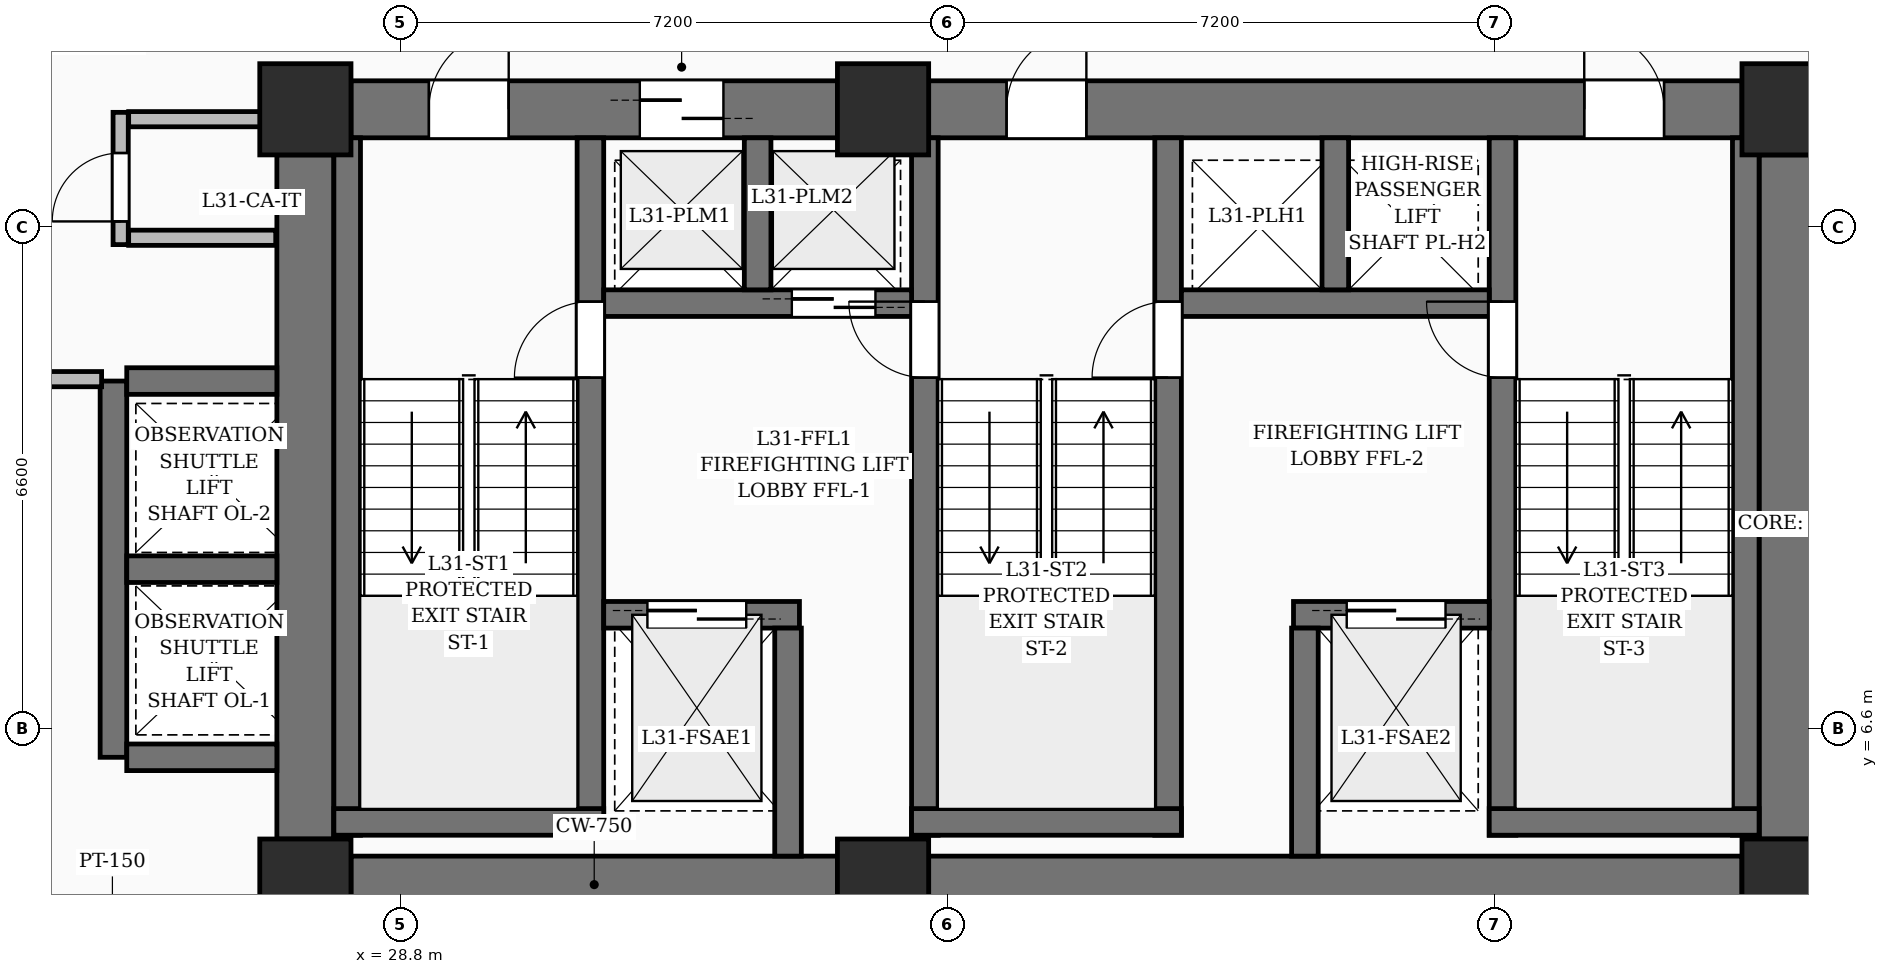
"""IFC4 building model, lengths in metres.
Left out: names, types, materials, properties, quantities, classifications, styles, units other than length and angle.
Written with IfcOpenShell. Run it as: python <this file> out.ifc"""

import sys

from ifc_helpers import new_model, si_unit, direction, frame, frame_2d, origin, origin_2d, place, context, subcontext, project, spatial, rectangle, extrude, element, fill, save


model = new_model("IFC4")
c1 = context("Model", 3, precision=1e-05, world=origin(), true_north=direction((0.0, 1.0)))
c2 = subcontext(c1, "Body", "Model", "MODEL_VIEW")
j1 = project(units=[si_unit("LENGTHUNIT", "METRE"), si_unit("PLANEANGLEUNIT", "RADIAN")], contexts=[c1])
p1 = place(None, origin())
s1 = spatial("IfcSite", under=j1, at=p1, CompositionType="ELEMENT")
p2 = place(p1, origin())
s2 = spatial("IfcBuilding", under=s1, at=p2, CompositionType="ELEMENT")
p3 = place(p2, frame((0.0, 0.0, 124.8)))
s3 = spatial("IfcBuildingStorey", under=s2, at=p3, CompositionType="ELEMENT", Elevation=124.8)
for number, where, z_axis, x_axis in (
    (1, (27.55, 4.55, 0.0), (0.0, 0.0, 1.0), (1.0, 0.0, 0.0)),
    (2, (35.15, 4.55, 0.0), (0.0, 0.0, 1.0), (1.0, 0.0, 0.0)),
    (3, (47.05, 4.55, 0.0), (0.0, 0.0, 1.0), (1.0, 0.0, 0.0)),
    (4, (27.55, 14.75, 0.0), (0.0, 0.0, 1.0), (1.0, 0.0, 0.0)),
    (5, (35.15, 14.75, 0.0), (0.0, 0.0, 1.0), (1.0, 0.0, 0.0)),
    (6, (47.05, 14.75, 0.0), (0.0, 0.0, 1.0), (1.0, 0.0, 0.0)),
):
    element("IfcColumn", number, at=place(p3, frame(where, z_axis=z_axis, x_axis=x_axis)), inside=s3, PredefinedType="COLUMN", context=c2, shape_type="SweptSolid", body=[
        extrude(rectangle(XDim=1.2, YDim=1.2, at=origin_2d()), origin(), (0.0, 0.0, 1.0), 3.6),
    ])
p4 = place(p3, frame((28.15, 4.55, 0.0), z_axis=(0.0, 0.0, 1.0), x_axis=(1.0, 0.0, 0.0)))
e7 = element("IfcWall", 7, at=p4, inside=s3, PredefinedType="SHEAR", context=c2, shape_type="SweptSolid", body=[
    extrude(rectangle(XDim=6.4, YDim=0.75, at=frame_2d((3.2, 0.0))), origin(), (0.0, 0.0, 1.0), 3.6),
])
p5 = place(p3, frame((35.75, 4.55, 0.0), z_axis=(0.0, 0.0, 1.0), x_axis=(1.0, 0.0, 0.0)))
e8 = element("IfcWall", 8, at=p5, inside=s3, PredefinedType="SHEAR", context=c2, shape_type="SweptSolid", body=[
    extrude(rectangle(XDim=10.7, YDim=0.75, at=frame_2d((5.35, 0.0))), origin(), (0.0, 0.0, 1.0), 3.6),
])
p6 = place(p3, frame((28.15, 14.75, 0.0), z_axis=(0.0, 0.0, 1.0), x_axis=(1.0, 0.0, 0.0)))
e9 = element("IfcWall", 9, at=p6, inside=s3, PredefinedType="SHEAR", context=c2, shape_type="SweptSolid", body=[
    extrude(rectangle(XDim=6.4, YDim=0.75, at=frame_2d((3.2, 0.0))), origin(), (0.0, 0.0, 1.0), 3.6),
])
p7 = place(p6, frame((1.025, 0.0, 0.0)))
e10 = element("IfcOpeningElement", 10, at=p7, cuts=e9, PredefinedType="OPENING", context=c2, shape_type="SweptSolid", body=[
    extrude(rectangle(XDim=1.05, YDim=2.15, at=frame_2d((0.525, 1.075))), frame((0.0, 0.385, 0.0), z_axis=(0.0, -1.0, 0.0), x_axis=(1.0, 0.0, 0.0)), (0.0, 0.0, 1.0), 0.77),
])
p8 = place(p6, frame((3.8, 0.0, 0.0)))
e11 = element("IfcOpeningElement", 11, at=p8, cuts=e9, PredefinedType="OPENING", context=c2, shape_type="SweptSolid", body=[
    extrude(rectangle(XDim=1.1, YDim=2.2, at=frame_2d((0.55, 1.1))), frame((0.0, 0.385, 0.0), z_axis=(0.0, -1.0, 0.0), x_axis=(1.0, 0.0, 0.0)), (0.0, 0.0, 1.0), 0.77),
])
p9 = place(p3, frame((35.75, 14.75, 0.0), z_axis=(0.0, 0.0, 1.0), x_axis=(1.0, 0.0, 0.0)))
e12 = element("IfcWall", 12, at=p9, inside=s3, PredefinedType="SHEAR", context=c2, shape_type="SweptSolid", body=[
    extrude(rectangle(XDim=10.7, YDim=0.75, at=frame_2d((5.35, 0.0))), origin(), (0.0, 0.0, 1.0), 3.6),
])
p10 = place(p9, frame((1.025, 0.0, 0.0)))
e13 = element("IfcOpeningElement", 13, at=p10, cuts=e12, PredefinedType="OPENING", context=c2, shape_type="SweptSolid", body=[
    extrude(rectangle(XDim=1.05, YDim=2.15, at=frame_2d((0.525, 1.075))), frame((0.0, 0.385, 0.0), z_axis=(0.0, -1.0, 0.0), x_axis=(1.0, 0.0, 0.0)), (0.0, 0.0, 1.0), 0.77),
])
p11 = place(p9, frame((8.625, 0.0, 0.0)))
e14 = element("IfcOpeningElement", 14, at=p11, cuts=e12, PredefinedType="OPENING", context=c2, shape_type="SweptSolid", body=[
    extrude(rectangle(XDim=1.05, YDim=2.15, at=frame_2d((0.525, 1.075))), frame((0.0, 0.385, 0.0), z_axis=(0.0, -1.0, 0.0), x_axis=(1.0, 0.0, 0.0)), (0.0, 0.0, 1.0), 0.77),
])
for number, where, z_axis, x_axis in (
    (15, (27.55, 5.15, 0.0), (0.0, 0.0, 1.0), (0.0, 1.0, 0.0)),
    (16, (47.05, 5.15, 0.0), (0.0, 0.0, 1.0), (0.0, 1.0, 0.0)),
):
    element("IfcWall", number, at=place(p3, frame(where, z_axis=z_axis, x_axis=x_axis)), inside=s3, PredefinedType="SHEAR", context=c2, shape_type="SweptSolid", body=[
        extrude(rectangle(XDim=9.0, YDim=0.75, at=frame_2d((4.5, 0.0))), origin(), (0.0, 0.0, 1.0), 3.6),
    ])
p12 = place(p3, frame((28.1, 5.2, 0.0), z_axis=(0.0, 0.0, 1.0), x_axis=(0.0, 1.0, 0.0)))
e17 = element("IfcWall", 17, at=p12, inside=s3, PredefinedType="SOLIDWALL", context=c2, shape_type="SweptSolid", body=[
    extrude(rectangle(XDim=9.175, YDim=0.35, at=frame_2d((4.587, 0.0))), origin(), (0.0, 0.0, 1.0), 3.6),
])
p13 = place(p3, frame((31.3, 5.2, 0.0), z_axis=(0.0, 0.0, 1.0), x_axis=(0.0, 1.0, 0.0)))
e18 = element("IfcWall", 18, at=p13, inside=s3, PredefinedType="SOLIDWALL", context=c2, shape_type="SweptSolid", body=[
    extrude(rectangle(XDim=9.175, YDim=0.35, at=frame_2d((4.587, 0.0))), origin(), (0.0, 0.0, 1.0), 3.6),
])
p14 = place(p13, frame((6.02, 0.0, 0.0)))
e19 = element("IfcOpeningElement", 19, at=p14, cuts=e18, PredefinedType="OPENING", context=c2, shape_type="SweptSolid", body=[
    extrude(rectangle(XDim=1.0, YDim=2.15, at=frame_2d((0.5, 1.075))), frame((0.0, 0.185, 0.0), z_axis=(0.0, -1.0, 0.0), x_axis=(1.0, 0.0, 0.0)), (0.0, 0.0, 1.0), 0.37),
])
p15 = place(p3, frame((27.925, 5.375, 0.0), z_axis=(0.0, 0.0, 1.0), x_axis=(1.0, 0.0, 0.0)))
e20 = element("IfcWall", 20, at=p15, inside=s3, PredefinedType="SOLIDWALL", context=c2, shape_type="SweptSolid", body=[
    extrude(rectangle(XDim=3.55, YDim=0.35, at=frame_2d((1.775, 0.0))), origin(), (0.0, 0.0, 1.0), 3.6),
])
p16 = place(p3, frame((35.7, 5.2, 0.0), z_axis=(0.0, 0.0, 1.0), x_axis=(0.0, 1.0, 0.0)))
e21 = element("IfcWall", 21, at=p16, inside=s3, PredefinedType="SOLIDWALL", context=c2, shape_type="SweptSolid", body=[
    extrude(rectangle(XDim=9.175, YDim=0.35, at=frame_2d((4.587, 0.0))), origin(), (0.0, 0.0, 1.0), 3.6),
])
p17 = place(p16, frame((6.02, 0.0, 0.0)))
e22 = element("IfcOpeningElement", 22, at=p17, cuts=e21, PredefinedType="OPENING", context=c2, shape_type="SweptSolid", body=[
    extrude(rectangle(XDim=1.0, YDim=2.15, at=frame_2d((0.5, 1.075))), frame((0.0, 0.185, 0.0), z_axis=(0.0, -1.0, 0.0), x_axis=(1.0, 0.0, 0.0)), (0.0, 0.0, 1.0), 0.37),
])
p18 = place(p3, frame((38.9, 5.2, 0.0), z_axis=(0.0, 0.0, 1.0), x_axis=(0.0, 1.0, 0.0)))
e23 = element("IfcWall", 23, at=p18, inside=s3, PredefinedType="SOLIDWALL", context=c2, shape_type="SweptSolid", body=[
    extrude(rectangle(XDim=9.175, YDim=0.35, at=frame_2d((4.587, 0.0))), origin(), (0.0, 0.0, 1.0), 3.6),
])
p19 = place(p18, frame((6.02, 0.0, 0.0)))
e24 = element("IfcOpeningElement", 24, at=p19, cuts=e23, PredefinedType="OPENING", context=c2, shape_type="SweptSolid", body=[
    extrude(rectangle(XDim=1.0, YDim=2.15, at=frame_2d((0.5, 1.075))), frame((0.0, 0.185, 0.0), z_axis=(0.0, -1.0, 0.0), x_axis=(1.0, 0.0, 0.0)), (0.0, 0.0, 1.0), 0.37),
])
p20 = place(p3, frame((35.525, 5.375, 0.0), z_axis=(0.0, 0.0, 1.0), x_axis=(1.0, 0.0, 0.0)))
e25 = element("IfcWall", 25, at=p20, inside=s3, PredefinedType="SOLIDWALL", context=c2, shape_type="SweptSolid", body=[
    extrude(rectangle(XDim=3.55, YDim=0.35, at=frame_2d((1.775, 0.0))), origin(), (0.0, 0.0, 1.0), 3.6),
])
p21 = place(p3, frame((43.3, 5.2, 0.0), z_axis=(0.0, 0.0, 1.0), x_axis=(0.0, 1.0, 0.0)))
e26 = element("IfcWall", 26, at=p21, inside=s3, PredefinedType="SOLIDWALL", context=c2, shape_type="SweptSolid", body=[
    extrude(rectangle(XDim=9.175, YDim=0.35, at=frame_2d((4.587, 0.0))), origin(), (0.0, 0.0, 1.0), 3.6),
])
p22 = place(p21, frame((6.02, 0.0, 0.0)))
e27 = element("IfcOpeningElement", 27, at=p22, cuts=e26, PredefinedType="OPENING", context=c2, shape_type="SweptSolid", body=[
    extrude(rectangle(XDim=1.0, YDim=2.15, at=frame_2d((0.5, 1.075))), frame((0.0, 0.185, 0.0), z_axis=(0.0, -1.0, 0.0), x_axis=(1.0, 0.0, 0.0)), (0.0, 0.0, 1.0), 0.37),
])
p23 = place(p3, frame((46.5, 5.2, 0.0), z_axis=(0.0, 0.0, 1.0), x_axis=(0.0, 1.0, 0.0)))
e28 = element("IfcWall", 28, at=p23, inside=s3, PredefinedType="SOLIDWALL", context=c2, shape_type="SweptSolid", body=[
    extrude(rectangle(XDim=9.175, YDim=0.35, at=frame_2d((4.587, 0.0))), origin(), (0.0, 0.0, 1.0), 3.6),
])
p24 = place(p3, frame((43.125, 5.375, 0.0), z_axis=(0.0, 0.0, 1.0), x_axis=(1.0, 0.0, 0.0)))
e29 = element("IfcWall", 29, at=p24, inside=s3, PredefinedType="SOLIDWALL", context=c2, shape_type="SweptSolid", body=[
    extrude(rectangle(XDim=3.55, YDim=0.35, at=frame_2d((1.775, 0.0))), origin(), (0.0, 0.0, 1.0), 3.6),
])
p25 = place(p3, frame((31.475, 8.1, 0.0), z_axis=(0.0, 0.0, 1.0), x_axis=(1.0, 0.0, 0.0)))
e30 = element("IfcWall", 30, at=p25, inside=s3, PredefinedType="SOLIDWALL", context=c2, shape_type="SweptSolid", body=[
    extrude(rectangle(XDim=2.575, YDim=0.35, at=frame_2d((1.288, 0.0))), origin(), (0.0, 0.0, 1.0), 3.6),
])
p26 = place(p25, frame((0.575, 0.0, 0.0)))
e31 = element("IfcOpeningElement", 31, at=p26, cuts=e30, PredefinedType="OPENING", context=c2, shape_type="SweptSolid", body=[
    extrude(rectangle(XDim=1.3, YDim=2.25, at=frame_2d((0.65, 1.125))), frame((0.0, 0.185, 0.0), z_axis=(0.0, -1.0, 0.0), x_axis=(1.0, 0.0, 0.0)), (0.0, 0.0, 1.0), 0.37),
])
p27 = place(p3, frame((40.55, 8.1, 0.0), z_axis=(0.0, 0.0, 1.0), x_axis=(1.0, 0.0, 0.0)))
e32 = element("IfcWall", 32, at=p27, inside=s3, PredefinedType="SOLIDWALL", context=c2, shape_type="SweptSolid", body=[
    extrude(rectangle(XDim=2.575, YDim=0.35, at=frame_2d((1.288, 0.0))), origin(), (0.0, 0.0, 1.0), 3.6),
])
p28 = place(p27, frame((0.7, 0.0, 0.0)))
e33 = element("IfcOpeningElement", 33, at=p28, cuts=e32, PredefinedType="OPENING", context=c2, shape_type="SweptSolid", body=[
    extrude(rectangle(XDim=1.3, YDim=2.25, at=frame_2d((0.65, 1.125))), frame((0.0, 0.185, 0.0), z_axis=(0.0, -1.0, 0.0), x_axis=(1.0, 0.0, 0.0)), (0.0, 0.0, 1.0), 0.37),
])
for number, where, z_axis, x_axis in (
    (34, (33.9, 4.925, 0.0), (0.0, 0.0, 1.0), (0.0, 1.0, 0.0)),
    (35, (40.7, 4.925, 0.0), (0.0, 0.0, 1.0), (0.0, 1.0, 0.0)),
):
    element("IfcWall", number, at=place(p3, frame(where, z_axis=z_axis, x_axis=x_axis)), inside=s3, PredefinedType="SOLIDWALL", context=c2, shape_type="SweptSolid", body=[
        extrude(rectangle(XDim=3.0, YDim=0.35, at=frame_2d((1.5, 0.0))), origin(), (0.0, 0.0, 1.0), 3.6),
    ])
p29 = place(p3, frame((31.475, 12.2, 0.0), z_axis=(0.0, 0.0, 1.0), x_axis=(1.0, 0.0, 0.0)))
e36 = element("IfcWall", 36, at=p29, inside=s3, PredefinedType="SOLIDWALL", context=c2, shape_type="SweptSolid", body=[
    extrude(rectangle(XDim=4.05, YDim=0.35, at=frame_2d((2.025, 0.0))), origin(), (0.0, 0.0, 1.0), 3.6),
])
p30 = place(p29, frame((2.475, 0.0, 0.0)))
e37 = element("IfcOpeningElement", 37, at=p30, cuts=e36, PredefinedType="OPENING", context=c2, shape_type="SweptSolid", body=[
    extrude(rectangle(XDim=1.1, YDim=2.2, at=frame_2d((0.55, 1.1))), frame((0.0, 0.185, 0.0), z_axis=(0.0, -1.0, 0.0), x_axis=(1.0, 0.0, 0.0)), (0.0, 0.0, 1.0), 0.37),
])
p31 = place(p3, frame((33.5, 12.375, 0.0), z_axis=(0.0, 0.0, 1.0), x_axis=(0.0, 1.0, 0.0)))
e38 = element("IfcWall", 38, at=p31, inside=s3, PredefinedType="SOLIDWALL", context=c2, shape_type="SweptSolid", body=[
    extrude(rectangle(XDim=2.0, YDim=0.35, at=frame_2d((1.0, 0.0))), origin(), (0.0, 0.0, 1.0), 3.6),
])
p32 = place(p3, frame((39.075, 12.2, 0.0), z_axis=(0.0, 0.0, 1.0), x_axis=(1.0, 0.0, 0.0)))
e39 = element("IfcWall", 39, at=p32, inside=s3, PredefinedType="SOLIDWALL", context=c2, shape_type="SweptSolid", body=[
    extrude(rectangle(XDim=4.05, YDim=0.35, at=frame_2d((2.025, 0.0))), origin(), (0.0, 0.0, 1.0), 3.6),
])
p33 = place(p3, frame((41.1, 12.375, 0.0), z_axis=(0.0, 0.0, 1.0), x_axis=(0.0, 1.0, 0.0)))
e40 = element("IfcWall", 40, at=p33, inside=s3, PredefinedType="SOLIDWALL", context=c2, shape_type="SweptSolid", body=[
    extrude(rectangle(XDim=2.0, YDim=0.35, at=frame_2d((1.0, 0.0))), origin(), (0.0, 0.0, 1.0), 3.6),
])
p34 = place(p3, frame((25.025, 6.225, 0.0), z_axis=(0.0, 0.0, 1.0), x_axis=(0.0, 1.0, 0.0)))
e41 = element("IfcWall", 41, at=p34, inside=s3, PredefinedType="SOLIDWALL", context=c2, shape_type="SweptSolid", body=[
    extrude(rectangle(XDim=4.95, YDim=0.35, at=frame_2d((2.475, 0.0))), origin(), (0.0, 0.0, 1.0), 3.6),
])
for number, where, z_axis, x_axis in (
    (42, (25.2, 6.225, 0.0), (0.0, 0.0, 1.0), (1.0, 0.0, 0.0)),
    (43, (25.2, 8.7, 0.0), (0.0, 0.0, 1.0), (1.0, 0.0, 0.0)),
    (44, (25.2, 11.175, 0.0), (0.0, 0.0, 1.0), (1.0, 0.0, 0.0)),
):
    element("IfcWall", number, at=place(p3, frame(where, z_axis=z_axis, x_axis=x_axis)), inside=s3, PredefinedType="SOLIDWALL", context=c2, shape_type="SweptSolid", body=[
        extrude(rectangle(XDim=1.975, YDim=0.35, at=frame_2d((0.988, 0.0))), origin(), (0.0, 0.0, 1.0), 3.6),
    ])
p35 = place(p3, frame((25.12, 12.97, 0.0), z_axis=(0.0, 0.0, 1.0), x_axis=(0.0, 1.0, 0.0)))
e45 = element("IfcWall", 45, at=p35, inside=s3, PredefinedType="PARTITIONING", context=c2, shape_type="SweptSolid", body=[
    extrude(rectangle(XDim=1.74, YDim=0.2, at=frame_2d((0.87, 0.0))), origin(), (0.0, 0.0, 1.0), 3.35),
])
p36 = place(p35, frame((0.305, 0.0, 0.0)))
e46 = element("IfcOpeningElement", 46, at=p36, cuts=e45, PredefinedType="OPENING", context=c2, shape_type="SweptSolid", body=[
    extrude(rectangle(XDim=0.9, YDim=2.1, at=frame_2d((0.45, 1.05))), frame((0.0, 0.11, 0.0), z_axis=(0.0, -1.0, 0.0), x_axis=(1.0, 0.0, 0.0)), (0.0, 0.0, 1.0), 0.22),
])
for number, where, z_axis, x_axis in (
    (47, (25.225, 14.62, 0.0), (0.0, 0.0, 1.0), (1.0, 0.0, 0.0)),
    (48, (25.225, 13.06, 0.0), (0.0, 0.0, 1.0), (1.0, 0.0, 0.0)),
):
    element("IfcWall", number, at=place(p3, frame(where, z_axis=z_axis, x_axis=x_axis)), inside=s3, PredefinedType="PARTITIONING", context=c2, shape_type="SweptSolid", body=[
        extrude(rectangle(XDim=1.935, YDim=0.2, at=frame_2d((0.967, 0.0))), origin(), (0.0, 0.0, 1.0), 3.35),
    ])
p37 = place(p3, frame((22.8, 11.2, 0.0), z_axis=(0.0, 0.0, 1.0), x_axis=(1.0, 0.0, 0.0)))
e49 = element("IfcWall", 49, at=p37, inside=s3, PredefinedType="PARTITIONING", context=c2, shape_type="SweptSolid", body=[
    extrude(rectangle(XDim=2.069, YDim=0.2, at=frame_2d((1.035, 0.0))), origin(), (0.0, 0.0, 1.0), 3.35),
])
p38 = place(p7, origin())
e50 = element("IfcDoor", 50, at=p38, inside=s3, OperationType="SINGLE_SWING_RIGHT", PredefinedType="DOOR", context=c2, shape_type="SweptSolid", body=[
    extrude(rectangle(XDim=1.05, YDim=2.15, at=frame_2d((0.525, 1.075))), frame((0.0, 0.025, 0.0), z_axis=(0.0, -1.0, 0.0), x_axis=(1.0, 0.0, 0.0)), (0.0, 0.0, 1.0), 0.05),
])
fill(e10, e50)
p39 = place(p10, origin())
e51 = element("IfcDoor", 51, at=p39, inside=s3, OperationType="SINGLE_SWING_RIGHT", PredefinedType="DOOR", context=c2, shape_type="SweptSolid", body=[
    extrude(rectangle(XDim=1.05, YDim=2.15, at=frame_2d((0.525, 1.075))), frame((0.0, 0.025, 0.0), z_axis=(0.0, -1.0, 0.0), x_axis=(1.0, 0.0, 0.0)), (0.0, 0.0, 1.0), 0.05),
])
fill(e13, e51)
p40 = place(p11, origin())
e52 = element("IfcDoor", 52, at=p40, inside=s3, OperationType="SINGLE_SWING_LEFT", PredefinedType="DOOR", context=c2, shape_type="SweptSolid", body=[
    extrude(rectangle(XDim=1.05, YDim=2.15, at=frame_2d((0.525, 1.075))), frame((0.0, 0.025, 0.0), z_axis=(0.0, -1.0, 0.0), x_axis=(1.0, 0.0, 0.0)), (0.0, 0.0, 1.0), 0.05),
])
fill(e14, e52)
p41 = place(p14, origin())
e53 = element("IfcDoor", 53, at=p41, inside=s3, OperationType="SINGLE_SWING_LEFT", PredefinedType="DOOR", context=c2, shape_type="SweptSolid", body=[
    extrude(rectangle(XDim=1.0, YDim=2.15, at=frame_2d((0.5, 1.075))), frame((0.0, 0.025, 0.0), z_axis=(0.0, -1.0, 0.0), x_axis=(1.0, 0.0, 0.0)), (0.0, 0.0, 1.0), 0.05),
])
fill(e19, e53)
p42 = place(p17, origin())
e54 = element("IfcDoor", 54, at=p42, inside=s3, OperationType="SINGLE_SWING_RIGHT", PredefinedType="DOOR", context=c2, shape_type="SweptSolid", body=[
    extrude(rectangle(XDim=1.0, YDim=2.15, at=frame_2d((0.5, 1.075))), frame((0.0, 0.025, 0.0), z_axis=(0.0, -1.0, 0.0), x_axis=(1.0, 0.0, 0.0)), (0.0, 0.0, 1.0), 0.05),
])
fill(e22, e54)
p43 = place(p19, origin())
e55 = element("IfcDoor", 55, at=p43, inside=s3, OperationType="SINGLE_SWING_LEFT", PredefinedType="DOOR", context=c2, shape_type="SweptSolid", body=[
    extrude(rectangle(XDim=1.0, YDim=2.15, at=frame_2d((0.5, 1.075))), frame((0.0, 0.025, 0.0), z_axis=(0.0, -1.0, 0.0), x_axis=(1.0, 0.0, 0.0)), (0.0, 0.0, 1.0), 0.05),
])
fill(e24, e55)
p44 = place(p22, origin())
e56 = element("IfcDoor", 56, at=p44, inside=s3, OperationType="SINGLE_SWING_RIGHT", PredefinedType="DOOR", context=c2, shape_type="SweptSolid", body=[
    extrude(rectangle(XDim=1.0, YDim=2.15, at=frame_2d((0.5, 1.075))), frame((0.0, 0.025, 0.0), z_axis=(0.0, -1.0, 0.0), x_axis=(1.0, 0.0, 0.0)), (0.0, 0.0, 1.0), 0.05),
])
fill(e27, e56)
p45 = place(p26, origin())
e57 = element("IfcDoor", 57, at=p45, inside=s3, OperationType="DOUBLE_DOOR_SLIDING", PredefinedType="DOOR", context=c2, shape_type="SweptSolid", body=[
    extrude(rectangle(XDim=1.3, YDim=2.25, at=frame_2d((0.65, 1.125))), frame((0.0, 0.025, 0.0), z_axis=(0.0, -1.0, 0.0), x_axis=(1.0, 0.0, 0.0)), (0.0, 0.0, 1.0), 0.05),
])
fill(e31, e57)
p46 = place(p28, origin())
e58 = element("IfcDoor", 58, at=p46, inside=s3, OperationType="DOUBLE_DOOR_SLIDING", PredefinedType="DOOR", context=c2, shape_type="SweptSolid", body=[
    extrude(rectangle(XDim=1.3, YDim=2.25, at=frame_2d((0.65, 1.125))), frame((0.0, 0.025, 0.0), z_axis=(0.0, -1.0, 0.0), x_axis=(1.0, 0.0, 0.0)), (0.0, 0.0, 1.0), 0.05),
])
fill(e33, e58)
p47 = place(p8, origin())
e59 = element("IfcDoor", 59, at=p47, inside=s3, OperationType="DOUBLE_DOOR_SLIDING", PredefinedType="DOOR", context=c2, shape_type="SweptSolid", body=[
    extrude(rectangle(XDim=1.1, YDim=2.2, at=frame_2d((0.55, 1.1))), frame((0.0, 0.025, 0.0), z_axis=(0.0, -1.0, 0.0), x_axis=(1.0, 0.0, 0.0)), (0.0, 0.0, 1.0), 0.05),
])
fill(e11, e59)
p48 = place(p30, origin())
e60 = element("IfcDoor", 60, at=p48, inside=s3, OperationType="DOUBLE_DOOR_SLIDING", PredefinedType="DOOR", context=c2, shape_type="SweptSolid", body=[
    extrude(rectangle(XDim=1.1, YDim=2.2, at=frame_2d((0.55, 1.1))), frame((0.0, 0.025, 0.0), z_axis=(0.0, -1.0, 0.0), x_axis=(1.0, 0.0, 0.0)), (0.0, 0.0, 1.0), 0.05),
])
fill(e37, e60)
p49 = place(p36, origin())
e61 = element("IfcDoor", 61, at=p49, inside=s3, OperationType="SINGLE_SWING_LEFT", PredefinedType="DOOR", context=c2, shape_type="SweptSolid", body=[
    extrude(rectangle(XDim=0.9, YDim=2.1, at=frame_2d((0.45, 1.05))), frame((0.0, 0.025, 0.0), z_axis=(0.0, -1.0, 0.0), x_axis=(1.0, 0.0, 0.0)), (0.0, 0.0, 1.0), 0.05),
])
fill(e46, e61)
save(model, sys.argv[1])
